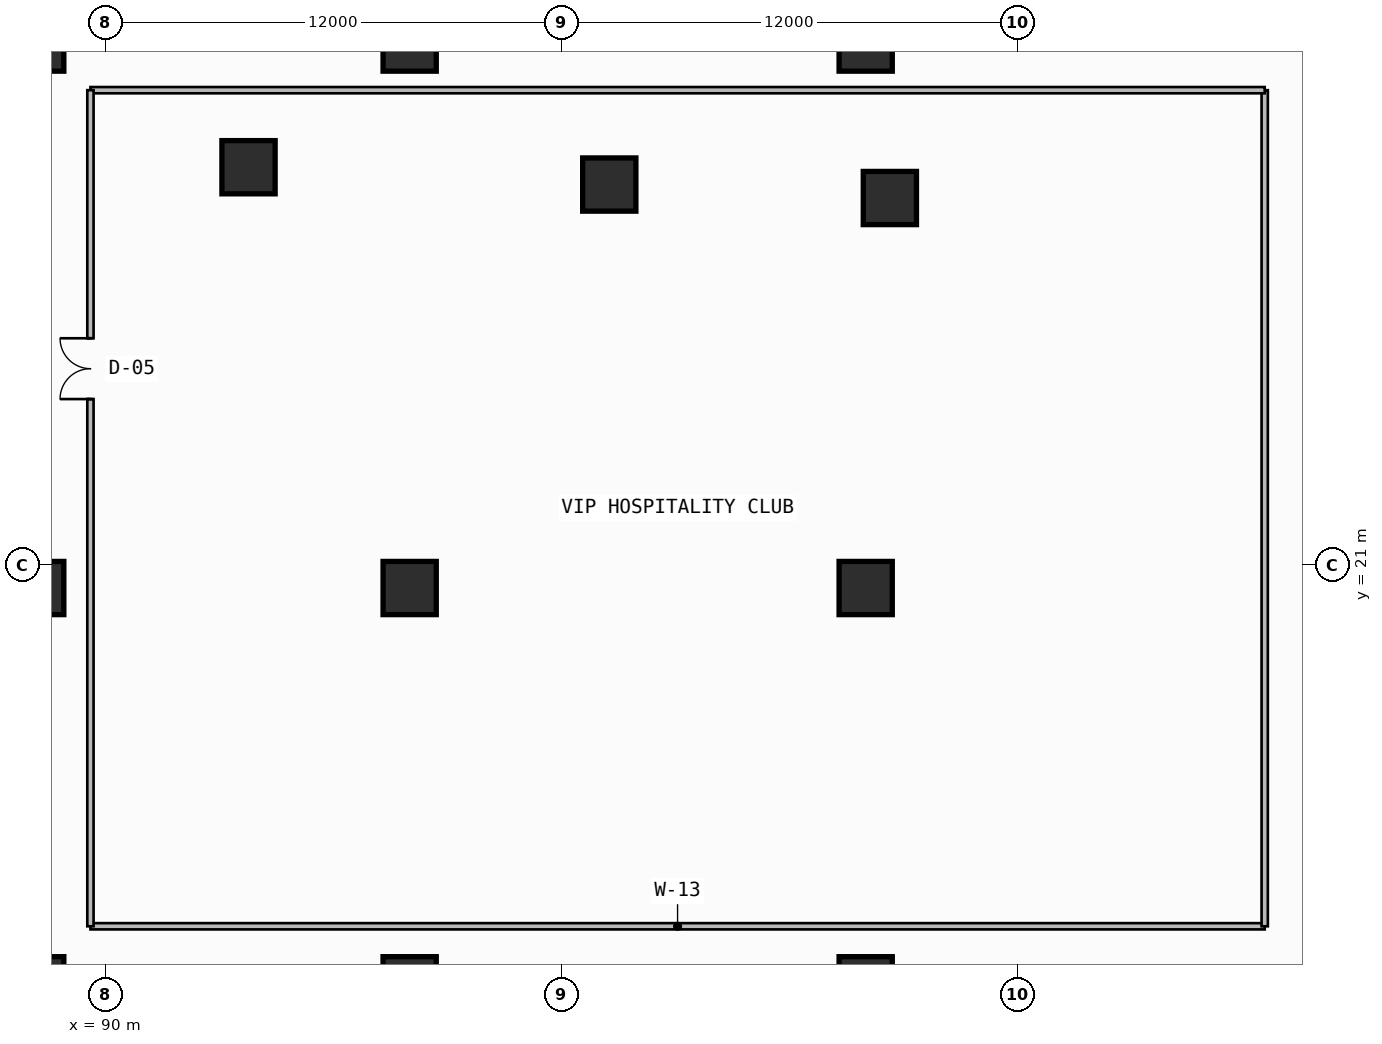
"""IFC4 building model, lengths in metres.
Left out: names, types, materials, properties, quantities, classifications, styles, units other than length and angle.
Written with IfcOpenShell. Run it as: python <this file> out.ifc"""

import sys

from ifc_helpers import new_model, si_unit, direction, frame, frame_2d, origin, origin_2d, place, context, subcontext, project, spatial, rectangle, extrude, element, fill, save


model = new_model("IFC4")
c1 = context("Model", 3, precision=1e-05, world=origin(), true_north=direction((0.0, 1.0)))
c2 = subcontext(c1, "Body", "Model", "MODEL_VIEW")
j1 = project(units=[si_unit("LENGTHUNIT", "METRE"), si_unit("PLANEANGLEUNIT", "RADIAN")], contexts=[c1])
p1 = place(None, origin())
s1 = spatial("IfcSite", under=j1, at=p1, CompositionType="ELEMENT")
p2 = place(p1, origin())
s2 = spatial("IfcBuilding", under=s1, at=p2, CompositionType="ELEMENT")
p3 = place(p2, frame((0.0, 0.0, 4.5)))
s3 = spatial("IfcBuildingStorey", under=s2, at=p3, CompositionType="ELEMENT", Elevation=4.5)
for number, where, z_axis, x_axis in (
    (1, (88.2, 10.0, 0.0), (0.0, 0.0, 1.0), (1.0, 0.0, 0.0)),
    (2, (88.2, 20.4, 0.0), (0.0, 0.0, 1.0), (1.0, 0.0, 0.0)),
    (3, (88.2, 34.7, 0.0), (0.0, 0.0, 1.0), (1.0, 0.0, 0.0)),
    (4, (98.0, 10.0, 0.0), (0.0, 0.0, 1.0), (1.0, 0.0, 0.0)),
    (5, (98.0, 20.4, 0.0), (0.0, 0.0, 1.0), (1.0, 0.0, 0.0)),
    (6, (98.0, 34.7, 0.0), (0.0, 0.0, 1.0), (1.0, 0.0, 0.0)),
    (7, (110.0, 10.0, 0.0), (0.0, 0.0, 1.0), (1.0, 0.0, 0.0)),
    (8, (110.0, 20.4, 0.0), (0.0, 0.0, 1.0), (1.0, 0.0, 0.0)),
    (9, (110.0, 34.7, 0.0), (0.0, 0.0, 1.0), (1.0, 0.0, 0.0)),
    (10, (93.76, 31.472, 0.0), (0.0, 0.0, 1.0), (1.0, 0.0, 0.0)),
    (11, (103.253, 31.017, 0.0), (0.0, 0.0, 1.0), (1.0, 0.0, 0.0)),
    (12, (110.636, 30.662, 0.0), (0.0, 0.0, 1.0), (1.0, 0.0, 0.0)),
):
    element("IfcColumn", number, at=place(p3, frame(where, z_axis=z_axis, x_axis=x_axis)), inside=s3, PredefinedType="COLUMN", context=c2, shape_type="SweptSolid", body=[
        extrude(rectangle(XDim=1.4, YDim=1.4, at=origin_2d()), origin(), (0.0, 0.0, 1.0), 4.5),
    ])
p4 = place(p3, frame((89.6, 11.5, 0.0), z_axis=(0.0, 0.0, 1.0), x_axis=(1.0, 0.0, 0.0)))
e13 = element("IfcWall", 13, at=p4, inside=s3, PredefinedType="PARTITIONING", context=c2, shape_type="SweptSolid", body=[
    extrude(rectangle(XDim=30.9, YDim=0.165, at=frame_2d((15.45, 0.0))), origin(), (0.0, 0.0, 1.0), 3.465),
])
p5 = place(p3, frame((120.5, 11.5, 0.0), z_axis=(0.0, 0.0, 1.0), x_axis=(0.0, 1.0, 0.0)))
e14 = element("IfcWall", 14, at=p5, inside=s3, PredefinedType="PARTITIONING", context=c2, shape_type="SweptSolid", body=[
    extrude(rectangle(XDim=22.0, YDim=0.165, at=frame_2d((11.0, 0.0))), origin(), (0.0, 0.0, 1.0), 3.465),
])
p6 = place(p3, frame((120.5, 33.5, 0.0), z_axis=(0.0, 0.0, 1.0), x_axis=(-1.0, 0.0, 0.0)))
e15 = element("IfcWall", 15, at=p6, inside=s3, PredefinedType="PARTITIONING", context=c2, shape_type="SweptSolid", body=[
    extrude(rectangle(XDim=30.9, YDim=0.165, at=frame_2d((15.45, 0.0))), origin(), (0.0, 0.0, 1.0), 3.465),
])
p7 = place(p3, frame((89.6, 33.5, 0.0), z_axis=(0.0, 0.0, 1.0), x_axis=(0.0, -1.0, 0.0)))
e16 = element("IfcWall", 16, at=p7, inside=s3, PredefinedType="PARTITIONING", context=c2, shape_type="SweptSolid", body=[
    extrude(rectangle(XDim=22.0, YDim=0.165, at=frame_2d((11.0, 0.0))), origin(), (0.0, 0.0, 1.0), 3.465),
])
p8 = place(p7, frame((6.528, 0.0, 0.0)))
e17 = element("IfcOpeningElement", 17, at=p8, cuts=e16, PredefinedType="OPENING", context=c2, shape_type="SweptSolid", body=[
    extrude(rectangle(XDim=1.6, YDim=2.3, at=frame_2d((0.8, 1.15))), frame((0.0, 0.093, 0.0), z_axis=(0.0, -1.0, 0.0), x_axis=(1.0, 0.0, 0.0)), (0.0, 0.0, 1.0), 0.185),
])
p9 = place(p8, frame((1.6, 0.0, 0.0), z_axis=(0.0, 0.0, 1.0), x_axis=(-1.0, 0.0, 0.0)))
e18 = element("IfcDoor", 18, at=p9, inside=s3, OperationType="DOUBLE_DOOR_SINGLE_SWING", PredefinedType="DOOR", context=c2, shape_type="SweptSolid", body=[
    extrude(rectangle(XDim=1.6, YDim=2.3, at=frame_2d((0.8, 1.15))), frame((0.0, 0.025, 0.0), z_axis=(0.0, -1.0, 0.0), x_axis=(1.0, 0.0, 0.0)), (0.0, 0.0, 1.0), 0.05),
])
fill(e17, e18)
save(model, sys.argv[1])
